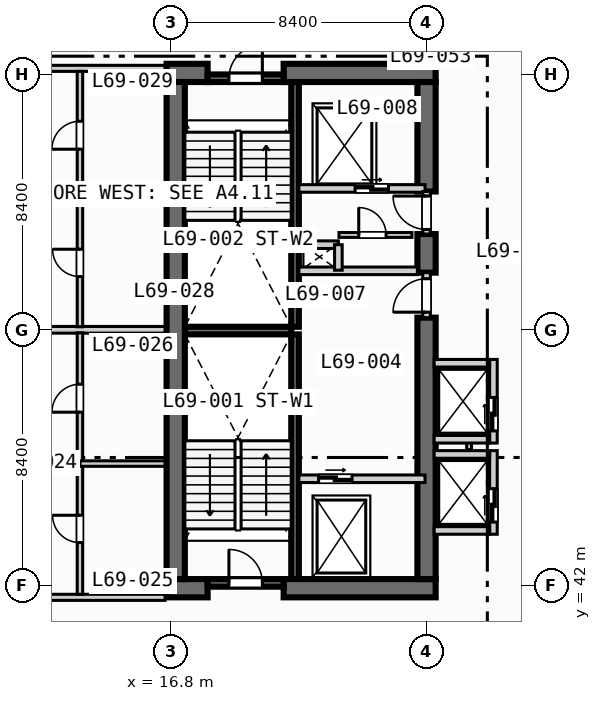
"""IFC4 building model, lengths in metres.
Left out: names, types, materials, properties, quantities, classifications, styles, units other than length and angle.
Written with IfcOpenShell. Run it as: python <this file> out.ifc"""

import sys

from ifc_helpers import new_model, si_unit, direction, frame, frame_2d, origin, place, context, subcontext, project, spatial, rectangle, extrude, element, fill, save


model = new_model("IFC4")
c1 = context("Model", 3, precision=1e-05, world=origin(), true_north=direction((0.0, 1.0)))
c2 = subcontext(c1, "Body", "Model", "MODEL_VIEW")
j1 = project(units=[si_unit("LENGTHUNIT", "METRE"), si_unit("PLANEANGLEUNIT", "RADIAN")], contexts=[c1])
p1 = place(None, origin())
s1 = spatial("IfcSite", under=j1, at=p1, CompositionType="ELEMENT")
p2 = place(p1, origin())
s2 = spatial("IfcBuilding", under=s1, at=p2, CompositionType="ELEMENT")
p3 = place(p2, frame((0.0, 0.0, 278.6)))
s3 = spatial("IfcBuildingStorey", under=s2, at=p3, CompositionType="ELEMENT", Elevation=278.6)
for number, where, z_axis, x_axis in (
    (1, (20.875, 42.2, 0.0), (0.0, 0.0, 1.0), (0.0, 1.0, 0.0)),
    (2, (20.875, 50.5, 0.0), (0.0, 0.0, 1.0), (0.0, 1.0, 0.0)),
):
    element("IfcWall", number, at=place(p3, frame(where, z_axis=z_axis, x_axis=x_axis)), inside=s3, PredefinedType="SOLIDWALL", context=c2, shape_type="SweptSolid", body=[
        extrude(rectangle(XDim=8.05, YDim=0.25, at=frame_2d((4.025, 0.0))), origin(), (0.0, 0.0, 1.0), 3.47),
    ])
p4 = place(p3, frame((17.25, 50.375, 0.0), z_axis=(0.0, 0.0, 1.0), x_axis=(1.0, 0.0, 0.0)))
e3 = element("IfcWall", 3, at=p4, inside=s3, PredefinedType="SOLIDWALL", context=c2, shape_type="SweptSolid", body=[
    extrude(rectangle(XDim=3.5, YDim=0.25, at=frame_2d((1.75, 0.0))), origin(), (0.0, 0.0, 1.0), 3.47),
])
p5 = place(p3, frame((16.65, 41.9, 0.0), z_axis=(0.0, 0.0, 1.0), x_axis=(1.0, 0.0, 0.0)))
e4 = element("IfcWall", 4, at=p5, inside=s3, PredefinedType="SHEAR", context=c2, shape_type="SweptSolid", body=[
    extrude(rectangle(XDim=1.35, YDim=0.6, at=frame_2d((0.675, 0.0))), origin(), (0.0, 0.0, 1.0), 3.47),
])
p6 = place(p3, frame((20.5, 41.9, 0.0), z_axis=(0.0, 0.0, 1.0), x_axis=(1.0, 0.0, 0.0)))
e5 = element("IfcWall", 5, at=p6, inside=s3, PredefinedType="SHEAR", context=c2, shape_type="SweptSolid", body=[
    extrude(rectangle(XDim=5.0, YDim=0.6, at=frame_2d((2.5, 0.0))), origin(), (0.0, 0.0, 1.0), 3.47),
])
p7 = place(p3, frame((16.65, 58.85, 0.0), z_axis=(0.0, 0.0, 1.0), x_axis=(1.0, 0.0, 0.0)))
e6 = element("IfcWall", 6, at=p7, inside=s3, PredefinedType="SHEAR", context=c2, shape_type="SweptSolid", body=[
    extrude(rectangle(XDim=1.35, YDim=0.6, at=frame_2d((0.675, 0.0))), origin(), (0.0, 0.0, 1.0), 3.47),
])
p8 = place(p3, frame((20.5, 58.85, 0.0), z_axis=(0.0, 0.0, 1.0), x_axis=(1.0, 0.0, 0.0)))
e7 = element("IfcWall", 7, at=p8, inside=s3, PredefinedType="SHEAR", context=c2, shape_type="SweptSolid", body=[
    extrude(rectangle(XDim=5.0, YDim=0.6, at=frame_2d((2.5, 0.0))), origin(), (0.0, 0.0, 1.0), 3.47),
])
p9 = place(p3, frame((16.95, 42.2, 0.0), z_axis=(0.0, 0.0, 1.0), x_axis=(0.0, 1.0, 0.0)))
e8 = element("IfcWall", 8, at=p9, inside=s3, PredefinedType="SHEAR", context=c2, shape_type="SweptSolid", body=[
    extrude(rectangle(XDim=16.35, YDim=0.6, at=frame_2d((8.175, 0.0))), origin(), (0.0, 0.0, 1.0), 3.47),
])
p10 = place(p3, frame((25.2, 42.2, 0.0), z_axis=(0.0, 0.0, 1.0), x_axis=(0.0, 1.0, 0.0)))
e9 = element("IfcWall", 9, at=p10, inside=s3, PredefinedType="SHEAR", context=c2, shape_type="SweptSolid", body=[
    extrude(rectangle(XDim=8.6, YDim=0.6, at=frame_2d((4.3, 0.0))), origin(), (0.0, 0.0, 1.0), 3.47),
])
p11 = place(p3, frame((25.2, 52.28, 0.0), z_axis=(0.0, 0.0, 1.0), x_axis=(0.0, 1.0, 0.0)))
e10 = element("IfcWall", 10, at=p11, inside=s3, PredefinedType="SHEAR", context=c2, shape_type="SweptSolid", body=[
    extrude(rectangle(XDim=1.27, YDim=0.6, at=frame_2d((0.635, 0.0))), origin(), (0.0, 0.0, 1.0), 3.47),
])
p12 = place(p3, frame((25.2, 54.95, 0.0), z_axis=(0.0, 0.0, 1.0), x_axis=(0.0, 1.0, 0.0)))
e11 = element("IfcWall", 11, at=p12, inside=s3, PredefinedType="SHEAR", context=c2, shape_type="SweptSolid", body=[
    extrude(rectangle(XDim=3.6, YDim=0.6, at=frame_2d((1.8, 0.0))), origin(), (0.0, 0.0, 1.0), 3.47),
])
p13 = place(p3, frame((18.0, 42.075, 0.0), z_axis=(0.0, 0.0, 1.0), x_axis=(1.0, 0.0, 0.0)))
e12 = element("IfcWall", 12, at=p13, inside=s3, PredefinedType="SOLIDWALL", context=c2, shape_type="SweptSolid", body=[
    extrude(rectangle(XDim=2.5, YDim=0.25, at=frame_2d((1.25, 0.0))), origin(), (0.0, 0.0, 1.0), 3.47),
])
p14 = place(p13, frame((0.7, 0.0, 0.0)))
e13 = element("IfcOpeningElement", 13, at=p14, cuts=e12, PredefinedType="OPENING", context=c2, shape_type="SweptSolid", body=[
    extrude(rectangle(XDim=1.1, YDim=2.15, at=frame_2d((0.55, 1.075))), frame((0.0, 0.135, 0.0), z_axis=(0.0, -1.0, 0.0), x_axis=(1.0, 0.0, 0.0)), (0.0, 0.0, 1.0), 0.27),
])
p15 = place(p3, frame((18.0, 58.675, 0.0), z_axis=(0.0, 0.0, 1.0), x_axis=(1.0, 0.0, 0.0)))
e14 = element("IfcWall", 14, at=p15, inside=s3, PredefinedType="SOLIDWALL", context=c2, shape_type="SweptSolid", body=[
    extrude(rectangle(XDim=2.5, YDim=0.25, at=frame_2d((1.25, 0.0))), origin(), (0.0, 0.0, 1.0), 3.47),
])
p16 = place(p15, frame((0.7, 0.0, 0.0)))
e15 = element("IfcOpeningElement", 15, at=p16, cuts=e14, PredefinedType="OPENING", context=c2, shape_type="SweptSolid", body=[
    extrude(rectangle(XDim=1.1, YDim=2.15, at=frame_2d((0.55, 1.075))), frame((0.0, 0.135, 0.0), z_axis=(0.0, -1.0, 0.0), x_axis=(1.0, 0.0, 0.0)), (0.0, 0.0, 1.0), 0.27),
])
p17 = place(p3, frame((21.0, 45.5, 0.0), z_axis=(0.0, 0.0, 1.0), x_axis=(1.0, 0.0, 0.0)))
e16 = element("IfcWall", 16, at=p17, inside=s3, PredefinedType="SOLIDWALL", context=c2, shape_type="SweptSolid", body=[
    extrude(rectangle(XDim=4.15, YDim=0.25, at=frame_2d((2.075, 0.0))), origin(), (0.0, 0.0, 1.0), 3.47),
])
p18 = place(p17, frame((0.65, 0.0, 0.0)))
e17 = element("IfcOpeningElement", 17, at=p18, cuts=e16, PredefinedType="OPENING", context=c2, shape_type="SweptSolid", body=[
    extrude(rectangle(XDim=1.1, YDim=2.15, at=frame_2d((0.55, 1.075))), frame((0.0, 0.135, 0.0), z_axis=(0.0, -1.0, 0.0), x_axis=(1.0, 0.0, 0.0)), (0.0, 0.0, 1.0), 0.27),
])
p19 = place(p3, frame((25.2, 50.8, 0.0), z_axis=(0.0, 0.0, 1.0), x_axis=(0.0, 1.0, 0.0)))
e18 = element("IfcWall", 18, at=p19, inside=s3, PredefinedType="SOLIDWALL", context=c2, shape_type="SweptSolid", body=[
    extrude(rectangle(XDim=1.48, YDim=0.25, at=frame_2d((0.74, 0.0))), origin(), (0.0, 0.0, 1.0), 3.47),
])
p20 = place(p19, frame((0.18, 0.0, 0.0)))
e19 = element("IfcOpeningElement", 19, at=p20, cuts=e18, PredefinedType="OPENING", context=c2, shape_type="SweptSolid", body=[
    extrude(rectangle(XDim=1.1, YDim=2.15, at=frame_2d((0.55, 1.075))), frame((0.0, 0.135, 0.0), z_axis=(0.0, -1.0, 0.0), x_axis=(1.0, 0.0, 0.0)), (0.0, 0.0, 1.0), 0.27),
])
p21 = place(p3, frame((21.0, 52.34, 0.0), z_axis=(0.0, 0.0, 1.0), x_axis=(1.0, 0.0, 0.0)))
e20 = element("IfcWall", 20, at=p21, inside=s3, PredefinedType="SOLIDWALL", context=c2, shape_type="SweptSolid", body=[
    extrude(rectangle(XDim=3.9, YDim=0.25, at=frame_2d((1.95, 0.0))), origin(), (0.0, 0.0, 1.0), 3.47),
])
p22 = place(p3, frame((21.0, 55.05, 0.0), z_axis=(0.0, 0.0, 1.0), x_axis=(1.0, 0.0, 0.0)))
e21 = element("IfcWall", 21, at=p22, inside=s3, PredefinedType="SOLIDWALL", context=c2, shape_type="SweptSolid", body=[
    extrude(rectangle(XDim=4.15, YDim=0.25, at=frame_2d((2.075, 0.0))), origin(), (0.0, 0.0, 1.0), 3.47),
])
p23 = place(p22, frame((1.85, 0.0, 0.0)))
e22 = element("IfcOpeningElement", 22, at=p23, cuts=e21, PredefinedType="OPENING", context=c2, shape_type="SweptSolid", body=[
    extrude(rectangle(XDim=1.1, YDim=2.15, at=frame_2d((0.55, 1.075))), frame((0.0, 0.135, 0.0), z_axis=(0.0, -1.0, 0.0), x_axis=(1.0, 0.0, 0.0)), (0.0, 0.0, 1.0), 0.27),
])
p24 = place(p3, frame((25.2, 53.55, 0.0), z_axis=(0.0, 0.0, 1.0), x_axis=(0.0, 1.0, 0.0)))
e23 = element("IfcWall", 23, at=p24, inside=s3, PredefinedType="SOLIDWALL", context=c2, shape_type="SweptSolid", body=[
    extrude(rectangle(XDim=1.4, YDim=0.25, at=frame_2d((0.7, 0.0))), origin(), (0.0, 0.0, 1.0), 3.47),
])
p25 = place(p24, frame((0.15, 0.0, 0.0)))
e24 = element("IfcOpeningElement", 24, at=p25, cuts=e23, PredefinedType="OPENING", context=c2, shape_type="SweptSolid", body=[
    extrude(rectangle(XDim=1.1, YDim=2.15, at=frame_2d((0.55, 1.075))), frame((0.0, 0.135, 0.0), z_axis=(0.0, -1.0, 0.0), x_axis=(1.0, 0.0, 0.0)), (0.0, 0.0, 1.0), 0.27),
])
p26 = place(p3, frame((21.0, 53.2, 0.0), z_axis=(0.0, 0.0, 1.0), x_axis=(1.0, 0.0, 0.0)))
e25 = element("IfcWall", 25, at=p26, inside=s3, PredefinedType="SOLIDWALL", context=c2, shape_type="SweptSolid", body=[
    extrude(rectangle(XDim=1.3, YDim=0.25, at=frame_2d((0.65, 0.0))), origin(), (0.0, 0.0, 1.0), 3.47),
])
p27 = place(p3, frame((22.3, 52.36, 0.0), z_axis=(0.0, 0.0, 1.0), x_axis=(0.0, 1.0, 0.0)))
e26 = element("IfcWall", 26, at=p27, inside=s3, PredefinedType="SOLIDWALL", context=c2, shape_type="SweptSolid", body=[
    extrude(rectangle(XDim=0.84, YDim=0.25, at=frame_2d((0.42, 0.0))), origin(), (0.0, 0.0, 1.0), 3.47),
])
p28 = place(p3, frame((22.32, 53.52, 0.0), z_axis=(0.0, 0.0, 1.0), x_axis=(1.0, 0.0, 0.0)))
e27 = element("IfcWall", 27, at=p28, inside=s3, PredefinedType="PARTITIONING", context=c2, shape_type="SweptSolid", body=[
    extrude(rectangle(XDim=2.4, YDim=0.16, at=frame_2d((1.2, 0.0))), origin(), (0.0, 0.0, 1.0), 3.47),
])
p29 = place(p28, frame((0.65, 0.0, 0.0)))
e28 = element("IfcOpeningElement", 28, at=p29, cuts=e27, PredefinedType="OPENING", context=c2, shape_type="SweptSolid", body=[
    extrude(rectangle(XDim=0.9, YDim=2.1, at=frame_2d((0.45, 1.05))), frame((0.0, 0.09, 0.0), z_axis=(0.0, -1.0, 0.0), x_axis=(1.0, 0.0, 0.0)), (0.0, 0.0, 1.0), 0.18),
])
p30 = place(p3, frame((27.4, 43.675, 0.0), z_axis=(0.0, 0.0, 1.0), x_axis=(0.0, 1.0, 0.0)))
e29 = element("IfcWall", 29, at=p30, inside=s3, PredefinedType="SOLIDWALL", context=c2, shape_type="SweptSolid", body=[
    extrude(rectangle(XDim=2.75, YDim=0.25, at=frame_2d((1.375, 0.0))), origin(), (0.0, 0.0, 1.0), 3.47),
])
p31 = place(p30, frame((0.4, 0.0, 0.0)))
e30 = element("IfcOpeningElement", 30, at=p31, cuts=e29, PredefinedType="OPENING", context=c2, shape_type="SweptSolid", body=[
    extrude(rectangle(XDim=1.1, YDim=2.15, at=frame_2d((0.55, 1.075))), frame((0.0, 0.135, 0.0), z_axis=(0.0, -1.0, 0.0), x_axis=(1.0, 0.0, 0.0)), (0.0, 0.0, 1.0), 0.27),
])
for number, where, z_axis, x_axis in (
    (31, (25.45, 43.8, 0.0), (0.0, 0.0, 1.0), (1.0, 0.0, 0.0)),
    (32, (25.45, 46.3, 0.0), (0.0, 0.0, 1.0), (1.0, 0.0, 0.0)),
):
    element("IfcWall", number, at=place(p3, frame(where, z_axis=z_axis, x_axis=x_axis)), inside=s3, PredefinedType="SOLIDWALL", context=c2, shape_type="SweptSolid", body=[
        extrude(rectangle(XDim=1.825, YDim=0.25, at=frame_2d((0.913, 0.0))), origin(), (0.0, 0.0, 1.0), 3.47),
    ])
p32 = place(p3, frame((26.6, 46.46, 0.0), z_axis=(0.0, 0.0, 1.0), x_axis=(0.0, 1.0, 0.0)))
e33 = element("IfcWall", 33, at=p32, inside=s3, PredefinedType="PARTITIONING", context=c2, shape_type="SweptSolid", body=[
    extrude(rectangle(XDim=0.88, YDim=0.16, at=frame_2d((0.44, 0.0))), origin(), (0.0, 0.0, 1.0), 3.47),
])
p33 = place(p3, frame((27.4, 46.675, 0.0), z_axis=(0.0, 0.0, 1.0), x_axis=(0.0, 1.0, 0.0)))
e34 = element("IfcWall", 34, at=p33, inside=s3, PredefinedType="SOLIDWALL", context=c2, shape_type="SweptSolid", body=[
    extrude(rectangle(XDim=2.75, YDim=0.25, at=frame_2d((1.375, 0.0))), origin(), (0.0, 0.0, 1.0), 3.47),
])
p34 = place(p33, frame((0.4, 0.0, 0.0)))
e35 = element("IfcOpeningElement", 35, at=p34, cuts=e34, PredefinedType="OPENING", context=c2, shape_type="SweptSolid", body=[
    extrude(rectangle(XDim=1.1, YDim=2.15, at=frame_2d((0.55, 1.075))), frame((0.0, 0.135, 0.0), z_axis=(0.0, -1.0, 0.0), x_axis=(1.0, 0.0, 0.0)), (0.0, 0.0, 1.0), 0.27),
])
for number, where, z_axis, x_axis in (
    (36, (25.45, 46.8, 0.0), (0.0, 0.0, 1.0), (1.0, 0.0, 0.0)),
    (37, (25.45, 49.3, 0.0), (0.0, 0.0, 1.0), (1.0, 0.0, 0.0)),
):
    element("IfcWall", number, at=place(p3, frame(where, z_axis=z_axis, x_axis=x_axis)), inside=s3, PredefinedType="SOLIDWALL", context=c2, shape_type="SweptSolid", body=[
        extrude(rectangle(XDim=1.825, YDim=0.25, at=frame_2d((0.913, 0.0))), origin(), (0.0, 0.0, 1.0), 3.47),
    ])
p35 = place(p3, frame((8.65, 41.6, 0.0), z_axis=(0.0, 0.0, 1.0), x_axis=(1.0, 0.0, 0.0)))
e38 = element("IfcWall", 38, at=p35, inside=s3, PredefinedType="PARTITIONING", context=c2, shape_type="SweptSolid", body=[
    extrude(rectangle(XDim=7.95, YDim=0.2, at=frame_2d((3.975, 0.0))), origin(), (0.0, 0.0, 1.0), 3.47),
])
p36 = place(p35, frame((2.0, 0.0, 0.0)))
e39 = element("IfcOpeningElement", 39, at=p36, cuts=e38, PredefinedType="OPENING", context=c2, shape_type="SweptSolid", body=[
    extrude(rectangle(XDim=1.0, YDim=2.15, at=frame_2d((0.5, 1.075))), frame((0.0, 0.11, 0.0), z_axis=(0.0, -1.0, 0.0), x_axis=(1.0, 0.0, 0.0)), (0.0, 0.0, 1.0), 0.22),
])
p37 = place(p3, frame((8.65, 59.0, 0.0), z_axis=(0.0, 0.0, 1.0), x_axis=(1.0, 0.0, 0.0)))
e40 = element("IfcWall", 40, at=p37, inside=s3, PredefinedType="PARTITIONING", context=c2, shape_type="SweptSolid", body=[
    extrude(rectangle(XDim=7.95, YDim=0.2, at=frame_2d((3.975, 0.0))), origin(), (0.0, 0.0, 1.0), 3.116),
])
p38 = place(p37, frame((2.0, 0.0, 0.0)))
e41 = element("IfcOpeningElement", 41, at=p38, cuts=e40, PredefinedType="OPENING", context=c2, shape_type="SweptSolid", body=[
    extrude(rectangle(XDim=1.0, YDim=2.15, at=frame_2d((0.5, 1.075))), frame((0.0, 0.11, 0.0), z_axis=(0.0, -1.0, 0.0), x_axis=(1.0, 0.0, 0.0)), (0.0, 0.0, 1.0), 0.22),
])
p39 = place(p3, frame((8.65, 50.4, 0.0), z_axis=(0.0, 0.0, 1.0), x_axis=(1.0, 0.0, 0.0)))
e42 = element("IfcWall", 42, at=p39, inside=s3, PredefinedType="PARTITIONING", context=c2, shape_type="SweptSolid", body=[
    extrude(rectangle(XDim=7.95, YDim=0.22, at=frame_2d((3.975, 0.0))), origin(), (0.0, 0.0, 1.0), 2.82),
])
p40 = place(p3, frame((13.8, 41.7, 0.0), z_axis=(0.0, 0.0, 1.0), x_axis=(0.0, 1.0, 0.0)))
e43 = element("IfcWall", 43, at=p40, inside=s3, PredefinedType="PLUMBINGWALL", context=c2, shape_type="SweptSolid", body=[
    extrude(rectangle(XDim=8.6, YDim=0.18, at=frame_2d((4.3, 0.0))), origin(), (0.0, 0.0, 1.0), 3.47),
])
p41 = place(p40, frame((1.7, 0.0, 0.0)))
e44 = element("IfcOpeningElement", 44, at=p41, cuts=e43, PredefinedType="OPENING", context=c2, shape_type="SweptSolid", body=[
    extrude(rectangle(XDim=0.9, YDim=2.1, at=frame_2d((0.45, 1.05))), frame((0.0, 0.1, 0.0), z_axis=(0.0, -1.0, 0.0), x_axis=(1.0, 0.0, 0.0)), (0.0, 0.0, 1.0), 0.2),
])
p42 = place(p40, frame((5.99, 0.0, 0.0)))
e45 = element("IfcOpeningElement", 45, at=p42, cuts=e43, PredefinedType="OPENING", context=c2, shape_type="SweptSolid", body=[
    extrude(rectangle(XDim=0.92, YDim=2.1, at=frame_2d((0.46, 1.05))), frame((0.0, 0.1, 0.0), z_axis=(0.0, -1.0, 0.0), x_axis=(1.0, 0.0, 0.0)), (0.0, 0.0, 1.0), 0.2),
])
p43 = place(p3, frame((13.8, 46.0, 0.0), z_axis=(0.0, 0.0, 1.0), x_axis=(1.0, 0.0, 0.0)))
e46 = element("IfcWall", 46, at=p43, inside=s3, PredefinedType="PLUMBINGWALL", context=c2, shape_type="SweptSolid", body=[
    extrude(rectangle(XDim=2.8, YDim=0.18, at=frame_2d((1.4, 0.0))), origin(), (0.0, 0.0, 1.0), 3.47),
])
p44 = place(p3, frame((13.8, 50.5, 0.0), z_axis=(0.0, 0.0, 1.0), x_axis=(0.0, 1.0, 0.0)))
e47 = element("IfcWall", 47, at=p44, inside=s3, PredefinedType="PLUMBINGWALL", context=c2, shape_type="SweptSolid", body=[
    extrude(rectangle(XDim=8.4, YDim=0.18, at=frame_2d((4.2, 0.0))), origin(), (0.0, 0.0, 1.0), 3.47),
])
p45 = place(p44, frame((1.65, 0.0, 0.0)))
e48 = element("IfcOpeningElement", 48, at=p45, cuts=e47, PredefinedType="OPENING", context=c2, shape_type="SweptSolid", body=[
    extrude(rectangle(XDim=0.9, YDim=2.1, at=frame_2d((0.45, 1.05))), frame((0.0, 0.1, 0.0), z_axis=(0.0, -1.0, 0.0), x_axis=(1.0, 0.0, 0.0)), (0.0, 0.0, 1.0), 0.2),
])
p46 = place(p44, frame((5.84, 0.0, 0.0)))
e49 = element("IfcOpeningElement", 49, at=p46, cuts=e47, PredefinedType="OPENING", context=c2, shape_type="SweptSolid", body=[
    extrude(rectangle(XDim=0.92, YDim=2.1, at=frame_2d((0.46, 1.05))), frame((0.0, 0.1, 0.0), z_axis=(0.0, -1.0, 0.0), x_axis=(1.0, 0.0, 0.0)), (0.0, 0.0, 1.0), 0.2),
])
p47 = place(p3, frame((13.8, 54.7, 0.0), z_axis=(0.0, 0.0, 1.0), x_axis=(1.0, 0.0, 0.0)))
e50 = element("IfcWall", 50, at=p47, inside=s3, PredefinedType="PLUMBINGWALL", context=c2, shape_type="SweptSolid", body=[
    extrude(rectangle(XDim=2.8, YDim=0.18, at=frame_2d((1.4, 0.0))), origin(), (0.0, 0.0, 1.0), 3.47),
])
p48 = place(p14, origin())
e51 = element("IfcDoor", 51, at=p48, inside=s3, OperationType="SINGLE_SWING_LEFT", PredefinedType="DOOR", context=c2, shape_type="SweptSolid", body=[
    extrude(rectangle(XDim=1.1, YDim=2.15, at=frame_2d((0.55, 1.075))), frame((0.0, 0.025, 0.0), z_axis=(0.0, -1.0, 0.0), x_axis=(1.0, 0.0, 0.0)), (0.0, 0.0, 1.0), 0.05),
])
fill(e13, e51)
p49 = place(p16, origin())
e52 = element("IfcDoor", 52, at=p49, inside=s3, OperationType="SINGLE_SWING_RIGHT", PredefinedType="DOOR", context=c2, shape_type="SweptSolid", body=[
    extrude(rectangle(XDim=1.1, YDim=2.15, at=frame_2d((0.55, 1.075))), frame((0.0, 0.025, 0.0), z_axis=(0.0, -1.0, 0.0), x_axis=(1.0, 0.0, 0.0)), (0.0, 0.0, 1.0), 0.05),
])
fill(e15, e52)
p50 = place(p18, origin())
e53 = element("IfcDoor", 53, at=p50, inside=s3, OperationType="SLIDING_TO_LEFT", PredefinedType="DOOR", context=c2, shape_type="SweptSolid", body=[
    extrude(rectangle(XDim=1.1, YDim=2.15, at=frame_2d((0.55, 1.075))), frame((0.0, 0.025, 0.0), z_axis=(0.0, -1.0, 0.0), x_axis=(1.0, 0.0, 0.0)), (0.0, 0.0, 1.0), 0.05),
])
fill(e17, e53)
p51 = place(p20, origin())
e54 = element("IfcDoor", 54, at=p51, inside=s3, OperationType="SINGLE_SWING_LEFT", PredefinedType="DOOR", context=c2, shape_type="SweptSolid", body=[
    extrude(rectangle(XDim=1.1, YDim=2.15, at=frame_2d((0.55, 1.075))), frame((0.0, 0.025, 0.0), z_axis=(0.0, -1.0, 0.0), x_axis=(1.0, 0.0, 0.0)), (0.0, 0.0, 1.0), 0.05),
])
fill(e19, e54)
p52 = place(p23, origin())
e55 = element("IfcDoor", 55, at=p52, inside=s3, OperationType="SLIDING_TO_LEFT", PredefinedType="DOOR", context=c2, shape_type="SweptSolid", body=[
    extrude(rectangle(XDim=1.1, YDim=2.15, at=frame_2d((0.55, 1.075))), frame((0.0, 0.025, 0.0), z_axis=(0.0, -1.0, 0.0), x_axis=(1.0, 0.0, 0.0)), (0.0, 0.0, 1.0), 0.05),
])
fill(e22, e55)
p53 = place(p25, origin())
e56 = element("IfcDoor", 56, at=p53, inside=s3, OperationType="SINGLE_SWING_RIGHT", PredefinedType="DOOR", context=c2, shape_type="SweptSolid", body=[
    extrude(rectangle(XDim=1.1, YDim=2.15, at=frame_2d((0.55, 1.075))), frame((0.0, 0.025, 0.0), z_axis=(0.0, -1.0, 0.0), x_axis=(1.0, 0.0, 0.0)), (0.0, 0.0, 1.0), 0.05),
])
fill(e24, e56)
p54 = place(p29, origin())
e57 = element("IfcDoor", 57, at=p54, inside=s3, OperationType="SINGLE_SWING_LEFT", PredefinedType="DOOR", context=c2, shape_type="SweptSolid", body=[
    extrude(rectangle(XDim=0.9, YDim=2.1, at=frame_2d((0.45, 1.05))), frame((0.0, 0.025, 0.0), z_axis=(0.0, -1.0, 0.0), x_axis=(1.0, 0.0, 0.0)), (0.0, 0.0, 1.0), 0.05),
])
fill(e28, e57)
p55 = place(p31, origin())
e58 = element("IfcDoor", 58, at=p55, inside=s3, OperationType="SLIDING_TO_LEFT", PredefinedType="DOOR", context=c2, shape_type="SweptSolid", body=[
    extrude(rectangle(XDim=1.1, YDim=2.15, at=frame_2d((0.55, 1.075))), frame((0.0, 0.025, 0.0), z_axis=(0.0, -1.0, 0.0), x_axis=(1.0, 0.0, 0.0)), (0.0, 0.0, 1.0), 0.05),
])
fill(e30, e58)
p56 = place(p34, origin())
e59 = element("IfcDoor", 59, at=p56, inside=s3, OperationType="SLIDING_TO_LEFT", PredefinedType="DOOR", context=c2, shape_type="SweptSolid", body=[
    extrude(rectangle(XDim=1.1, YDim=2.15, at=frame_2d((0.55, 1.075))), frame((0.0, 0.025, 0.0), z_axis=(0.0, -1.0, 0.0), x_axis=(1.0, 0.0, 0.0)), (0.0, 0.0, 1.0), 0.05),
])
fill(e35, e59)
p57 = place(p41, origin())
e60 = element("IfcDoor", 60, at=p57, inside=s3, OperationType="SINGLE_SWING_RIGHT", PredefinedType="DOOR", context=c2, shape_type="SweptSolid", body=[
    extrude(rectangle(XDim=0.9, YDim=2.1, at=frame_2d((0.45, 1.05))), frame((0.0, 0.025, 0.0), z_axis=(0.0, -1.0, 0.0), x_axis=(1.0, 0.0, 0.0)), (0.0, 0.0, 1.0), 0.05),
])
fill(e44, e60)
p58 = place(p42, origin())
e61 = element("IfcDoor", 61, at=p58, inside=s3, OperationType="SINGLE_SWING_LEFT", PredefinedType="DOOR", context=c2, shape_type="SweptSolid", body=[
    extrude(rectangle(XDim=0.92, YDim=2.1, at=frame_2d((0.46, 1.05))), frame((0.0, 0.025, 0.0), z_axis=(0.0, -1.0, 0.0), x_axis=(1.0, 0.0, 0.0)), (0.0, 0.0, 1.0), 0.05),
])
fill(e45, e61)
p59 = place(p45, origin())
e62 = element("IfcDoor", 62, at=p59, inside=s3, OperationType="SINGLE_SWING_RIGHT", PredefinedType="DOOR", context=c2, shape_type="SweptSolid", body=[
    extrude(rectangle(XDim=0.9, YDim=2.1, at=frame_2d((0.45, 1.05))), frame((0.0, 0.025, 0.0), z_axis=(0.0, -1.0, 0.0), x_axis=(1.0, 0.0, 0.0)), (0.0, 0.0, 1.0), 0.05),
])
fill(e48, e62)
p60 = place(p46, origin())
e63 = element("IfcDoor", 63, at=p60, inside=s3, OperationType="SINGLE_SWING_LEFT", PredefinedType="DOOR", context=c2, shape_type="SweptSolid", body=[
    extrude(rectangle(XDim=0.92, YDim=2.1, at=frame_2d((0.46, 1.05))), frame((0.0, 0.025, 0.0), z_axis=(0.0, -1.0, 0.0), x_axis=(1.0, 0.0, 0.0)), (0.0, 0.0, 1.0), 0.05),
])
fill(e49, e63)
save(model, sys.argv[1])
